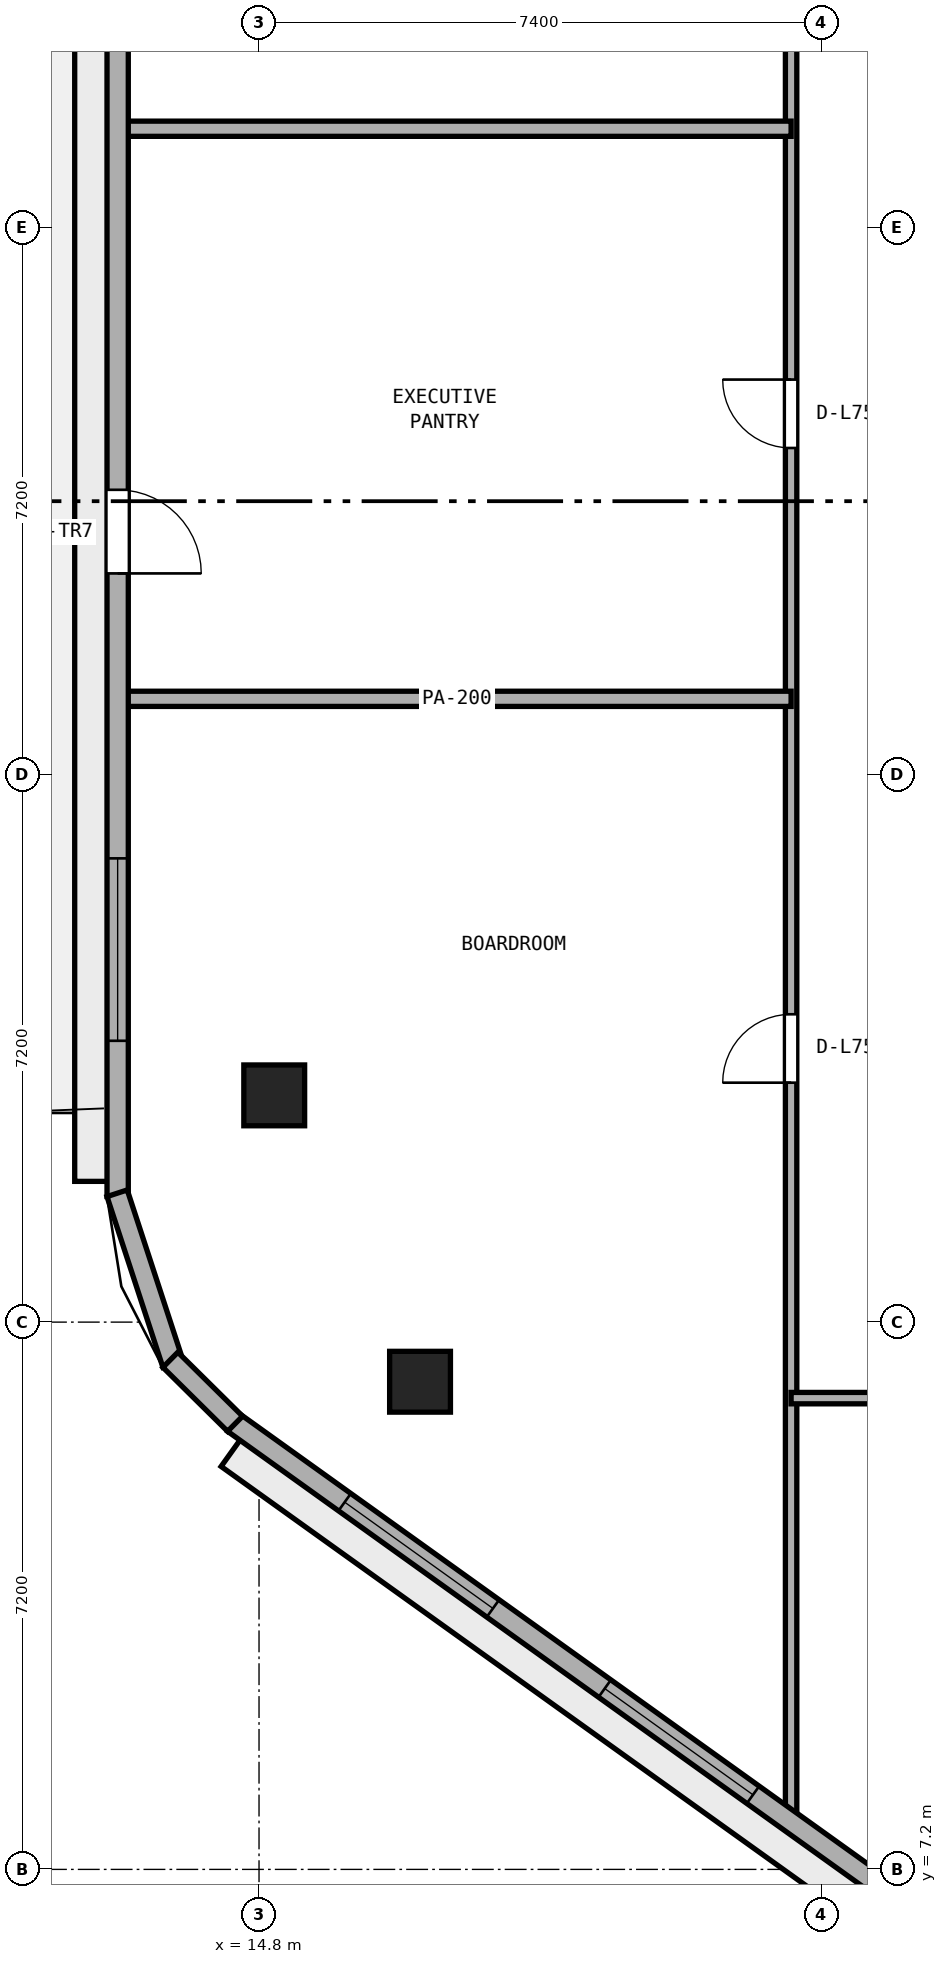
"""IFC4 building model, lengths in metres.
Left out: names, types, materials, properties, quantities, classifications, styles, units other than length and angle.
Written with IfcOpenShell. Run it as: python <this file> out.ifc"""

import sys

from ifc_helpers import new_model, si_unit, direction, frame, frame_2d, origin, origin_2d, place, context, subcontext, project, spatial, rectangle, extrude, element, fill, save


model = new_model("IFC4")
c1 = context("Model", 3, precision=1e-05, world=origin(), true_north=direction((0.0, 1.0)))
c2 = subcontext(c1, "Body", "Model", "MODEL_VIEW")
j1 = project(units=[si_unit("LENGTHUNIT", "METRE"), si_unit("PLANEANGLEUNIT", "RADIAN")], contexts=[c1])
p1 = place(None, origin())
s1 = spatial("IfcSite", under=j1, at=p1, CompositionType="ELEMENT")
p2 = place(p1, origin())
s2 = spatial("IfcBuilding", under=s1, at=p2, CompositionType="ELEMENT")
p3 = place(p2, frame((0.0, 0.0, 293.4)))
s3 = spatial("IfcBuildingStorey", under=s2, at=p3, CompositionType="ELEMENT", Elevation=293.4)
for number, where, z_axis, x_axis in (
    (1, (15.0, 17.383, 0.0), (0.0, 0.0, 1.0), (1.0, 0.0, 0.0)),
    (2, (16.918, 13.616, 0.0), (0.0, 0.0, 1.0), (1.0, 0.0, 0.0)),
):
    element("IfcColumn", number, at=place(p3, frame(where, z_axis=z_axis, x_axis=x_axis)), inside=s3, PredefinedType="COLUMN", context=c2, shape_type="SweptSolid", body=[
        extrude(rectangle(XDim=0.8, YDim=0.8, at=origin_2d()), origin(), (0.0, 0.0, 1.0), 3.8),
    ])
p4 = place(p3, frame((21.8, 7.79, 0.0), z_axis=(0.0, 0.0, 1.0), x_axis=(0.0, 1.0, 0.0)))
e3 = element("IfcWall", 3, at=p4, inside=s3, PredefinedType="PARTITIONING", context=c2, shape_type="SweptSolid", body=[
    extrude(rectangle(XDim=29.21, YDim=0.15, at=frame_2d((14.605, 0.0))), origin(), (0.0, 0.0, 1.0), 3.54),
])
p5 = place(p4, frame((9.76, 0.0, 0.0)))
e4 = element("IfcOpeningElement", 4, at=p5, cuts=e3, PredefinedType="OPENING", context=c2, shape_type="SweptSolid", body=[
    extrude(rectangle(XDim=0.9, YDim=2.1, at=frame_2d((0.45, 1.05))), frame((0.0, 0.085, 0.0), z_axis=(0.0, -1.0, 0.0), x_axis=(1.0, 0.0, 0.0)), (0.0, 0.0, 1.0), 0.17),
])
p6 = place(p4, frame((18.11, 0.0, 0.0)))
e5 = element("IfcOpeningElement", 5, at=p6, cuts=e3, PredefinedType="OPENING", context=c2, shape_type="SweptSolid", body=[
    extrude(rectangle(XDim=0.9, YDim=2.1, at=frame_2d((0.45, 1.05))), frame((0.0, 0.085, 0.0), z_axis=(0.0, -1.0, 0.0), x_axis=(1.0, 0.0, 0.0)), (0.0, 0.0, 1.0), 0.17),
])
p7 = place(p4, frame((23.485, 0.0, 0.0)))
e6 = element("IfcOpeningElement", 6, at=p7, cuts=e3, PredefinedType="OPENING", context=c2, shape_type="SweptSolid", body=[
    extrude(rectangle(XDim=0.9, YDim=2.1, at=frame_2d((0.45, 1.05))), frame((0.0, 0.085, 0.0), z_axis=(0.0, -1.0, 0.0), x_axis=(1.0, 0.0, 0.0)), (0.0, 0.0, 1.0), 0.17),
])
p8 = place(p3, frame((21.8, 13.4, 0.0), z_axis=(0.0, 0.0, 1.0), x_axis=(1.0, 0.0, 0.0)))
e7 = element("IfcWall", 7, at=p8, inside=s3, PredefinedType="PARTITIONING", context=c2, shape_type="SweptSolid", body=[
    extrude(rectangle(XDim=26.8, YDim=0.15, at=frame_2d((13.4, 0.0))), origin(), (0.0, 0.0, 1.0), 3.54),
])
p9 = place(p8, frame((3.92, 0.0, 0.0)))
e8 = element("IfcOpeningElement", 8, at=p9, cuts=e7, PredefinedType="OPENING", context=c2, shape_type="SweptSolid", body=[
    extrude(rectangle(XDim=1.0, YDim=2.12, at=frame_2d((0.5, 1.06))), frame((0.0, 0.085, 0.0), z_axis=(0.0, -1.0, 0.0), x_axis=(1.0, 0.0, 0.0)), (0.0, 0.0, 1.0), 0.17),
])
p10 = place(p8, frame((13.85, 0.0, 0.0)))
e9 = element("IfcOpeningElement", 9, at=p10, cuts=e7, PredefinedType="OPENING", context=c2, shape_type="SweptSolid", body=[
    extrude(rectangle(XDim=1.0, YDim=2.12, at=frame_2d((0.5, 1.06))), frame((0.0, 0.085, 0.0), z_axis=(0.0, -1.0, 0.0), x_axis=(1.0, 0.0, 0.0)), (0.0, 0.0, 1.0), 0.17),
])
p11 = place(p8, frame((22.88, 0.0, 0.0)))
e10 = element("IfcOpeningElement", 10, at=p11, cuts=e7, PredefinedType="OPENING", context=c2, shape_type="SweptSolid", body=[
    extrude(rectangle(XDim=0.9, YDim=2.1, at=frame_2d((0.45, 1.05))), frame((0.0, 0.085, 0.0), z_axis=(0.0, -1.0, 0.0), x_axis=(1.0, 0.0, 0.0)), (0.0, 0.0, 1.0), 0.17),
])
for number, where, z_axis, x_axis in (
    (11, (13.005, 22.6, 0.0), (0.0, 0.0, 1.0), (1.0, 0.0, 0.0)),
    (12, (13.005, 30.1, 0.0), (0.0, 0.0, 1.0), (1.0, 0.0, 0.0)),
):
    element("IfcWall", number, at=place(p3, frame(where, z_axis=z_axis, x_axis=x_axis)), inside=s3, PredefinedType="PARTITIONING", context=c2, shape_type="SweptSolid", body=[
        extrude(rectangle(XDim=8.795, YDim=0.2, at=frame_2d((4.397, 0.0))), origin(), (0.0, 0.0, 1.0), 3.54),
    ])
p12 = place(p3, frame((12.94, 33.548, 0.0), z_axis=(0.0, 0.0, 1.0), x_axis=(0.0, -1.0, 0.0)))
e13 = element("IfcWall", 13, at=p12, inside=s3, PredefinedType="STANDARD", context=c2, shape_type="SweptSolid", body=[
    extrude(rectangle(XDim=17.496, YDim=0.28, at=frame_2d((8.748, 0.0))), origin(), (0.0, 0.0, 1.0), 3.54),
])
p13 = place(p12, frame((8.198, 0.0, 0.0)))
e14 = element("IfcOpeningElement", 14, at=p13, cuts=e13, PredefinedType="OPENING", context=c2, shape_type="SweptSolid", body=[
    extrude(rectangle(XDim=1.1, YDim=2.2, at=frame_2d((0.55, 1.1))), frame((0.0, 0.15, 0.0), z_axis=(0.0, -1.0, 0.0), x_axis=(1.0, 0.0, 0.0)), (0.0, 0.0, 1.0), 0.3),
])
p14 = place(p12, frame((13.047, 0.0, 0.9)))
e15 = element("IfcOpeningElement", 15, at=p14, cuts=e13, PredefinedType="OPENING", context=c2, shape_type="SweptSolid", body=[
    extrude(rectangle(XDim=2.4, YDim=1.75, at=frame_2d((1.2, 0.875))), frame((0.0, 0.15, 0.0), z_axis=(0.0, -1.0, 0.0), x_axis=(1.0, 0.0, 0.0)), (0.0, 0.0, 1.0), 0.3),
])
p15 = place(p3, frame((14.468, 13.077, 0.0), z_axis=(0.0, 0.0, 1.0), x_axis=(0.812809888039, -0.582529042972, 0.0)))
e16 = element("IfcWall", 16, at=p15, inside=s3, PredefinedType="STANDARD", context=c2, shape_type="SweptSolid", body=[
    extrude(rectangle(XDim=15.968, YDim=0.28, at=frame_2d((7.984, 0.0))), origin(), (0.0, 0.0, 1.0), 3.54),
])
p16 = place(p15, frame((1.795, 0.0, 0.9)))
e17 = element("IfcOpeningElement", 17, at=p16, cuts=e16, PredefinedType="OPENING", context=c2, shape_type="SweptSolid", body=[
    extrude(rectangle(XDim=2.4, YDim=1.75, at=frame_2d((1.2, 0.875))), frame((0.0, 0.15, 0.0), z_axis=(0.0, -1.0, 0.0), x_axis=(1.0, 0.0, 0.0)), (0.0, 0.0, 1.0), 0.3),
])
p17 = place(p15, frame((6.004, 0.0, 0.9)))
e18 = element("IfcOpeningElement", 18, at=p17, cuts=e16, PredefinedType="OPENING", context=c2, shape_type="SweptSolid", body=[
    extrude(rectangle(XDim=2.4, YDim=1.75, at=frame_2d((1.2, 0.875))), frame((0.0, 0.15, 0.0), z_axis=(0.0, -1.0, 0.0), x_axis=(1.0, 0.0, 0.0)), (0.0, 0.0, 1.0), 0.3),
])
p18 = place(p15, frame((11.773, 0.0, 0.9)))
e19 = element("IfcOpeningElement", 19, at=p18, cuts=e16, PredefinedType="OPENING", context=c2, shape_type="SweptSolid", body=[
    extrude(rectangle(XDim=2.4, YDim=1.75, at=frame_2d((1.2, 0.875))), frame((0.0, 0.15, 0.0), z_axis=(0.0, -1.0, 0.0), x_axis=(1.0, 0.0, 0.0)), (0.0, 0.0, 1.0), 0.3),
])
p19 = place(p3, frame((12.933, 16.095, 0.0), z_axis=(0.0, 0.0, 1.0), x_axis=(0.3110492363, -0.950393798695, 0.0)))
e20 = element("IfcWall", 20, at=p19, inside=s3, PredefinedType="STANDARD", context=c2, shape_type="SweptSolid", body=[
    extrude(rectangle(XDim=2.364, YDim=0.28, at=frame_2d((1.182, 0.0))), origin(), (0.0, 0.0, 1.0), 3.54),
])
p20 = place(p3, frame((13.634, 13.904, 0.0), z_axis=(0.0, 0.0, 1.0), x_axis=(0.710971221429, -0.703221104845, 0.0)))
e21 = element("IfcWall", 21, at=p20, inside=s3, PredefinedType="STANDARD", context=c2, shape_type="SweptSolid", body=[
    extrude(rectangle(XDim=1.197, YDim=0.28, at=frame_2d((0.599, 0.0))), origin(), (0.0, 0.0, 1.0), 3.54),
])
p21 = place(p5, origin())
e22 = element("IfcDoor", 22, at=p21, inside=s3, OperationType="SINGLE_SWING_LEFT", PredefinedType="DOOR", context=c2, shape_type="SweptSolid", body=[
    extrude(rectangle(XDim=0.9, YDim=2.1, at=frame_2d((0.45, 1.05))), frame((0.0, 0.025, 0.0), z_axis=(0.0, -1.0, 0.0), x_axis=(1.0, 0.0, 0.0)), (0.0, 0.0, 1.0), 0.05),
])
fill(e4, e22)
p22 = place(p6, origin())
e23 = element("IfcDoor", 23, at=p22, inside=s3, OperationType="SINGLE_SWING_RIGHT", PredefinedType="DOOR", context=c2, shape_type="SweptSolid", body=[
    extrude(rectangle(XDim=0.9, YDim=2.1, at=frame_2d((0.45, 1.05))), frame((0.0, 0.025, 0.0), z_axis=(0.0, -1.0, 0.0), x_axis=(1.0, 0.0, 0.0)), (0.0, 0.0, 1.0), 0.05),
])
fill(e5, e23)
p23 = place(p13, origin())
e24 = element("IfcDoor", 24, at=p23, inside=s3, OperationType="SINGLE_SWING_RIGHT", PredefinedType="DOOR", context=c2, shape_type="SweptSolid", body=[
    extrude(rectangle(XDim=1.1, YDim=2.2, at=frame_2d((0.55, 1.1))), frame((0.0, 0.025, 0.0), z_axis=(0.0, -1.0, 0.0), x_axis=(1.0, 0.0, 0.0)), (0.0, 0.0, 1.0), 0.05),
])
fill(e14, e24)
p24 = place(p14, origin())
e25 = element("IfcWindow", 25, at=p24, inside=s3, PartitioningType="SINGLE_PANEL", PredefinedType="WINDOW", context=c2, shape_type="SweptSolid", body=[
    extrude(rectangle(XDim=2.4, YDim=1.75, at=frame_2d((1.2, 0.875))), frame((0.0, 0.03, 0.0), z_axis=(0.0, -1.0, 0.0), x_axis=(1.0, 0.0, 0.0)), (0.0, 0.0, 1.0), 0.06),
])
fill(e15, e25)
p25 = place(p16, origin())
e26 = element("IfcWindow", 26, at=p25, inside=s3, PartitioningType="SINGLE_PANEL", PredefinedType="WINDOW", context=c2, shape_type="SweptSolid", body=[
    extrude(rectangle(XDim=2.4, YDim=1.75, at=frame_2d((1.2, 0.875))), frame((0.0, 0.03, 0.0), z_axis=(0.0, -1.0, 0.0), x_axis=(1.0, 0.0, 0.0)), (0.0, 0.0, 1.0), 0.06),
])
fill(e17, e26)
p26 = place(p17, origin())
e27 = element("IfcWindow", 27, at=p26, inside=s3, PartitioningType="SINGLE_PANEL", PredefinedType="WINDOW", context=c2, shape_type="SweptSolid", body=[
    extrude(rectangle(XDim=2.4, YDim=1.75, at=frame_2d((1.2, 0.875))), frame((0.0, 0.03, 0.0), z_axis=(0.0, -1.0, 0.0), x_axis=(1.0, 0.0, 0.0)), (0.0, 0.0, 1.0), 0.06),
])
fill(e18, e27)
save(model, sys.argv[1])
